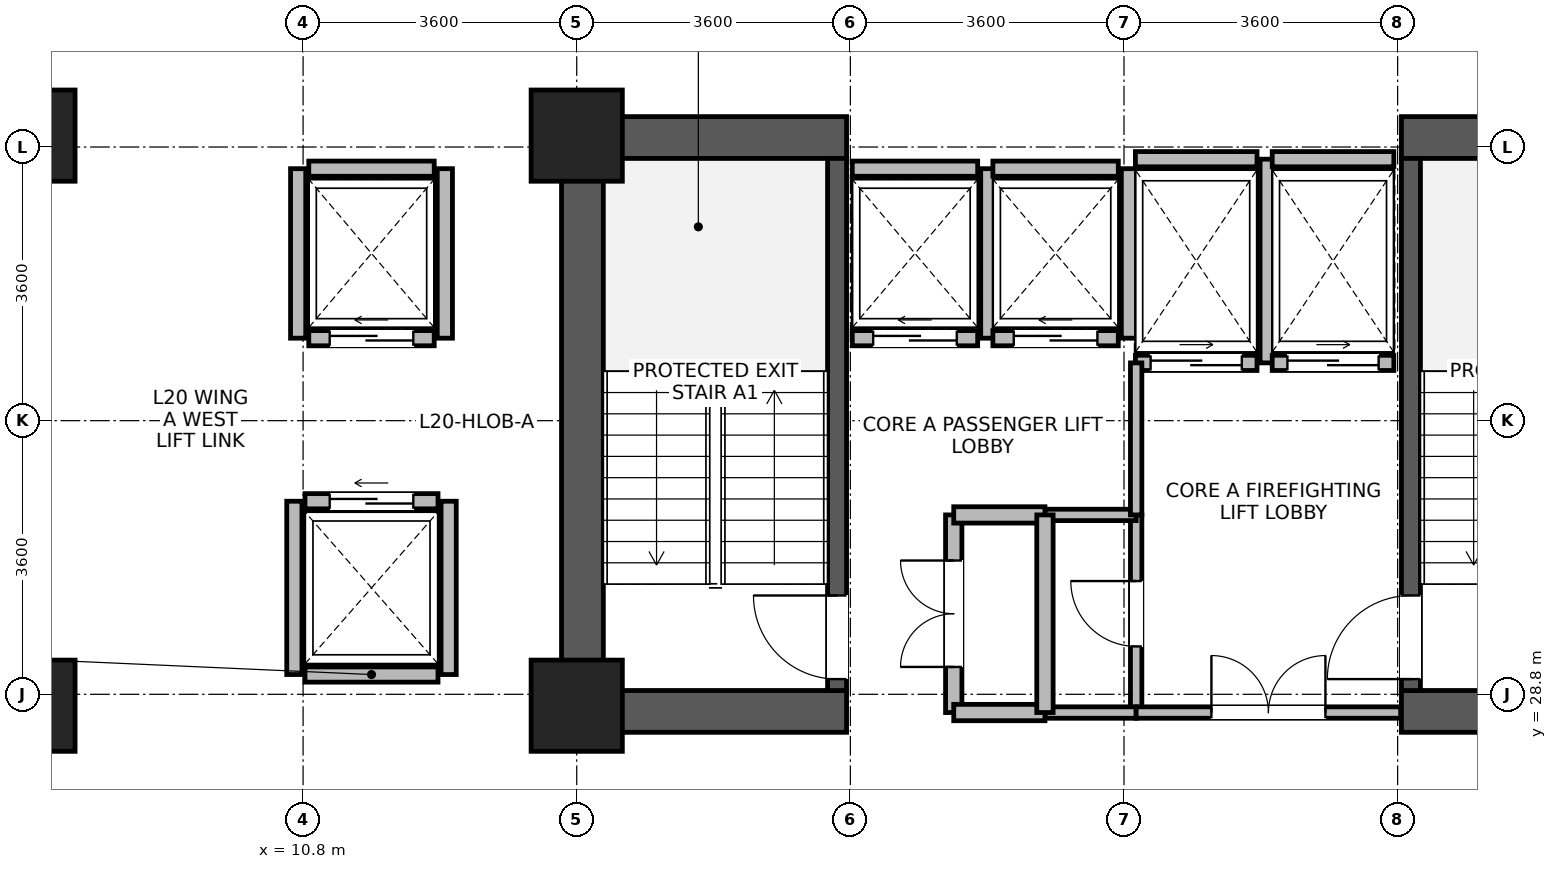
"""IFC4 building model, lengths in metres.
Left out: names, types, materials, properties, quantities, classifications, styles, units other than length and angle.
Written with IfcOpenShell. Run it as: python <this file> out.ifc"""

import sys

from ifc_helpers import new_model, si_unit, direction, frame, frame_2d, origin, origin_2d, place, context, subcontext, project, spatial, rectangle, extrude, source, transform, mapped, element, fill, save


model = new_model("IFC4")
c1 = context("Model", 3, precision=1e-05, world=origin(), true_north=direction((0.0, 1.0)))
c2 = subcontext(c1, "Body", "Model", "MODEL_VIEW")
j1 = project(units=[si_unit("LENGTHUNIT", "METRE"), si_unit("PLANEANGLEUNIT", "RADIAN")], contexts=[c1])
p1 = place(None, origin())
s1 = spatial("IfcSite", under=j1, at=p1, CompositionType="ELEMENT")
p2 = place(p1, origin())
s2 = spatial("IfcBuilding", under=s1, at=p2, CompositionType="ELEMENT")
p3 = place(p2, frame((0.0, 0.0, 82.3)))
s3 = spatial("IfcBuildingStorey", under=s2, at=p3, CompositionType="ELEMENT", Elevation=82.3)
p4 = place(p3, frame((14.475, 28.3, 0.0), z_axis=(0.0, 0.0, 1.0), x_axis=(0.0, 1.0, 0.0)))
e1 = element("IfcWall", 1, at=p4, inside=s3, PredefinedType="SHEAR", context=c2, shape_type="SweptSolid", body=[
    extrude(rectangle(XDim=8.1, YDim=0.55, at=frame_2d((4.05, 0.0))), origin(), (0.0, 0.0, 1.0), 3.45),
])
for number, where, z_axis, x_axis in (
    (2, (14.75, 28.575, 0.0), (0.0, 0.0, 1.0), (1.0, 0.0, 0.0)),
    (3, (25.25, 28.575, 0.0), (0.0, 0.0, 1.0), (1.0, 0.0, 0.0)),
    (4, (14.75, 36.125, 0.0), (0.0, 0.0, 1.0), (1.0, 0.0, 0.0)),
    (5, (25.25, 36.125, 0.0), (0.0, 0.0, 1.0), (1.0, 0.0, 0.0)),
):
    element("IfcWall", number, at=place(p3, frame(where, z_axis=z_axis, x_axis=x_axis)), inside=s3, PredefinedType="SHEAR", context=c2, shape_type="SweptSolid", body=[
        extrude(rectangle(XDim=3.2, YDim=0.55, at=frame_2d((1.6, 0.0))), origin(), (0.0, 0.0, 1.0), 3.45),
    ])
p5 = place(p3, frame((17.825, 28.85, 0.0), z_axis=(0.0, 0.0, 1.0), x_axis=(0.0, 1.0, 0.0)))
e6 = element("IfcWall", 6, at=p5, inside=s3, PredefinedType="SHEAR", context=c2, shape_type="SweptSolid", body=[
    extrude(rectangle(XDim=7.0, YDim=0.25, at=frame_2d((3.5, 0.0))), origin(), (0.0, 0.0, 1.0), 3.45),
])
p6 = place(p5, frame((0.15, 0.0, 0.0)))
e7 = element("IfcOpeningElement", 7, at=p6, cuts=e6, PredefinedType="OPENING", context=c2, shape_type="SweptSolid", body=[
    extrude(rectangle(XDim=1.1, YDim=2.08, at=frame_2d((0.55, 1.04))), frame((0.0, 0.135, 0.0), z_axis=(0.0, -1.0, 0.0), x_axis=(1.0, 0.0, 0.0)), (0.0, 0.0, 1.0), 0.27),
])
p7 = place(p3, frame((25.375, 28.85, 0.0), z_axis=(0.0, 0.0, 1.0), x_axis=(0.0, 1.0, 0.0)))
e8 = element("IfcWall", 8, at=p7, inside=s3, PredefinedType="SHEAR", context=c2, shape_type="SweptSolid", body=[
    extrude(rectangle(XDim=7.0, YDim=0.25, at=frame_2d((3.5, 0.0))), origin(), (0.0, 0.0, 1.0), 3.45),
])
p8 = place(p7, frame((0.15, 0.0, 0.0)))
e9 = element("IfcOpeningElement", 9, at=p8, cuts=e8, PredefinedType="OPENING", context=c2, shape_type="SweptSolid", body=[
    extrude(rectangle(XDim=1.1, YDim=2.08, at=frame_2d((0.55, 1.04))), frame((0.0, 0.135, 0.0), z_axis=(0.0, -1.0, 0.0), x_axis=(1.0, 0.0, 0.0)), (0.0, 0.0, 1.0), 0.27),
])
m1 = source(origin(), c2, "Body", "SweptSolid", [
    extrude(rectangle(XDim=1.2, YDim=1.2, at=origin_2d()), origin(), (0.0, 0.0, 1.0), 3.7),
])
for number, where, z_axis, x_axis in (
    (10, (7.2, 28.65, 0.0), (0.0, 0.0, 1.0), (1.0, 0.0, 0.0)),
    (11, (7.2, 36.15, 0.0), (0.0, 0.0, 1.0), (1.0, 0.0, 0.0)),
    (12, (14.4, 28.65, 0.0), (0.0, 0.0, 1.0), (1.0, 0.0, 0.0)),
    (13, (14.4, 36.15, 0.0), (0.0, 0.0, 1.0), (1.0, 0.0, 0.0)),
):
    element("IfcColumn", number, at=place(p3, frame(where, z_axis=z_axis, x_axis=x_axis)), inside=s3, PredefinedType="COLUMN", context=c2, shape_type="MappedRepresentation", body=[
        mapped(m1, transform((0.0, 0.0, 0.0), x_axis=(1.0, 0.0, 0.0), y_axis=(0.0, 1.0, 0.0), z_axis=(0.0, 0.0, 1.0), scale=1.0)),
    ])
p9 = place(p3, frame((18.025, 33.485, 0.0), z_axis=(0.0, 0.0, 1.0), x_axis=(1.0, 0.0, 0.0)))
e14 = element("IfcWall", 14, at=p9, inside=s3, PredefinedType="PARTITIONING", context=c2, shape_type="SweptSolid", body=[
    extrude(rectangle(XDim=1.65, YDim=0.2, at=frame_2d((0.825, 0.0))), origin(), (0.0, 0.0, 1.0), 3.43),
])
p10 = place(p9, frame((0.275, 0.0, 0.0)))
e15 = element("IfcOpeningElement", 15, at=p10, cuts=e14, PredefinedType="OPENING", context=c2, shape_type="SweptSolid", body=[
    extrude(rectangle(XDim=1.1, YDim=2.12, at=frame_2d((0.55, 1.06))), frame((0.0, 0.11, 0.0), z_axis=(0.0, -1.0, 0.0), x_axis=(1.0, 0.0, 0.0)), (0.0, 0.0, 1.0), 0.22),
])
p11 = place(p3, frame((18.025, 35.715, 0.0), z_axis=(0.0, 0.0, 1.0), x_axis=(1.0, 0.0, 0.0)))
e16 = element("IfcWall", 16, at=p11, inside=s3, PredefinedType="PARTITIONING", context=c2, shape_type="SweptSolid", body=[
    extrude(rectangle(XDim=1.65, YDim=0.2, at=frame_2d((0.825, 0.0))), origin(), (0.0, 0.0, 1.0), 2.23),
])
p12 = place(p3, frame((19.815, 33.485, 0.0), z_axis=(0.0, 0.0, 1.0), x_axis=(0.0, 1.0, 0.0)))
e17 = element("IfcWall", 17, at=p12, inside=s3, PredefinedType="PARTITIONING", context=c2, shape_type="SweptSolid", body=[
    extrude(rectangle(XDim=2.23, YDim=0.2, at=frame_2d((1.115, 0.0))), origin(), (0.0, 0.0, 1.0), 3.43),
])
p13 = place(p3, frame((19.875, 33.485, 0.0), z_axis=(0.0, 0.0, 1.0), x_axis=(1.0, 0.0, 0.0)))
e18 = element("IfcWall", 18, at=p13, inside=s3, PredefinedType="PARTITIONING", context=c2, shape_type="SweptSolid", body=[
    extrude(rectangle(XDim=1.65, YDim=0.2, at=frame_2d((0.825, 0.0))), origin(), (0.0, 0.0, 1.0), 3.43),
])
p14 = place(p13, frame((0.275, 0.0, 0.0)))
e19 = element("IfcOpeningElement", 19, at=p14, cuts=e18, PredefinedType="OPENING", context=c2, shape_type="SweptSolid", body=[
    extrude(rectangle(XDim=1.1, YDim=2.12, at=frame_2d((0.55, 1.06))), frame((0.0, 0.11, 0.0), z_axis=(0.0, -1.0, 0.0), x_axis=(1.0, 0.0, 0.0)), (0.0, 0.0, 1.0), 0.22),
])
p15 = place(p3, frame((19.875, 35.715, 0.0), z_axis=(0.0, 0.0, 1.0), x_axis=(1.0, 0.0, 0.0)))
e20 = element("IfcWall", 20, at=p15, inside=s3, PredefinedType="PARTITIONING", context=c2, shape_type="SweptSolid", body=[
    extrude(rectangle(XDim=1.65, YDim=0.2, at=frame_2d((0.825, 0.0))), origin(), (0.0, 0.0, 1.0), 2.23),
])
p16 = place(p3, frame((21.665, 33.485, 0.0), z_axis=(0.0, 0.0, 1.0), x_axis=(0.0, 1.0, 0.0)))
e21 = element("IfcWall", 21, at=p16, inside=s3, PredefinedType="PARTITIONING", context=c2, shape_type="SweptSolid", body=[
    extrude(rectangle(XDim=2.23, YDim=0.2, at=frame_2d((1.115, 0.0))), origin(), (0.0, 0.0, 1.0), 3.43),
])
p17 = place(p3, frame((10.825, 29.06, 0.0), z_axis=(0.0, 0.0, 1.0), x_axis=(1.0, 0.0, 0.0)))
e22 = element("IfcWall", 22, at=p17, inside=s3, PredefinedType="PARTITIONING", context=c2, shape_type="SweptSolid", body=[
    extrude(rectangle(XDim=1.75, YDim=0.2, at=frame_2d((0.875, 0.0))), origin(), (0.0, 0.0, 1.0), 3.43),
])
p18 = place(p3, frame((10.825, 31.34, 0.0), z_axis=(0.0, 0.0, 1.0), x_axis=(1.0, 0.0, 0.0)))
e23 = element("IfcWall", 23, at=p18, inside=s3, PredefinedType="PARTITIONING", context=c2, shape_type="SweptSolid", body=[
    extrude(rectangle(XDim=1.75, YDim=0.2, at=frame_2d((0.875, 0.0))), origin(), (0.0, 0.0, 1.0), 3.43),
])
p19 = place(p18, frame((0.325, 0.0, 0.0)))
e24 = element("IfcOpeningElement", 24, at=p19, cuts=e23, PredefinedType="OPENING", context=c2, shape_type="SweptSolid", body=[
    extrude(rectangle(XDim=1.1, YDim=2.12, at=frame_2d((0.55, 1.06))), frame((0.0, 0.11, 0.0), z_axis=(0.0, -1.0, 0.0), x_axis=(1.0, 0.0, 0.0)), (0.0, 0.0, 1.0), 0.22),
])
for number, where, z_axis, x_axis in (
    (25, (10.685, 29.06, 0.0), (0.0, 0.0, 1.0), (0.0, 1.0, 0.0)),
    (26, (12.715, 29.06, 0.0), (0.0, 0.0, 1.0), (0.0, 1.0, 0.0)),
):
    element("IfcWall", number, at=place(p3, frame(where, z_axis=z_axis, x_axis=x_axis)), inside=s3, PredefinedType="PARTITIONING", context=c2, shape_type="SweptSolid", body=[
        extrude(rectangle(XDim=2.28, YDim=0.2, at=frame_2d((1.14, 0.0))), origin(), (0.0, 0.0, 1.0), 3.43),
    ])
p20 = place(p3, frame((10.875, 33.485, 0.0), z_axis=(0.0, 0.0, 1.0), x_axis=(1.0, 0.0, 0.0)))
e27 = element("IfcWall", 27, at=p20, inside=s3, PredefinedType="PARTITIONING", context=c2, shape_type="SweptSolid", body=[
    extrude(rectangle(XDim=1.65, YDim=0.2, at=frame_2d((0.825, 0.0))), origin(), (0.0, 0.0, 1.0), 3.43),
])
p21 = place(p20, frame((0.275, 0.0, 0.0)))
e28 = element("IfcOpeningElement", 28, at=p21, cuts=e27, PredefinedType="OPENING", context=c2, shape_type="SweptSolid", body=[
    extrude(rectangle(XDim=1.1, YDim=2.12, at=frame_2d((0.55, 1.06))), frame((0.0, 0.11, 0.0), z_axis=(0.0, -1.0, 0.0), x_axis=(1.0, 0.0, 0.0)), (0.0, 0.0, 1.0), 0.22),
])
p22 = place(p3, frame((10.875, 35.715, 0.0), z_axis=(0.0, 0.0, 1.0), x_axis=(1.0, 0.0, 0.0)))
e29 = element("IfcWall", 29, at=p22, inside=s3, PredefinedType="PARTITIONING", context=c2, shape_type="SweptSolid", body=[
    extrude(rectangle(XDim=1.65, YDim=0.2, at=frame_2d((0.825, 0.0))), origin(), (0.0, 0.0, 1.0), 3.43),
])
for number, where, z_axis, x_axis in (
    (30, (10.735, 33.485, 0.0), (0.0, 0.0, 1.0), (0.0, 1.0, 0.0)),
    (31, (12.665, 33.485, 0.0), (0.0, 0.0, 1.0), (0.0, 1.0, 0.0)),
):
    element("IfcWall", number, at=place(p3, frame(where, z_axis=z_axis, x_axis=x_axis)), inside=s3, PredefinedType="PARTITIONING", context=c2, shape_type="SweptSolid", body=[
        extrude(rectangle(XDim=2.23, YDim=0.2, at=frame_2d((1.115, 0.0))), origin(), (0.0, 0.0, 1.0), 3.43),
    ])
p23 = place(p3, frame((21.75, 33.16, 0.0), z_axis=(0.0, 0.0, 1.0), x_axis=(1.0, 0.0, 0.0)))
e32 = element("IfcWall", 32, at=p23, inside=s3, PredefinedType="PARTITIONING", context=c2, shape_type="SweptSolid", body=[
    extrude(rectangle(XDim=1.6, YDim=0.2, at=frame_2d((0.8, 0.0))), origin(), (0.0, 0.0, 1.0), 3.43),
])
p24 = place(p23, frame((0.2, 0.0, 0.0)))
e33 = element("IfcOpeningElement", 33, at=p24, cuts=e32, PredefinedType="OPENING", context=c2, shape_type="SweptSolid", body=[
    extrude(rectangle(XDim=1.2, YDim=2.12, at=frame_2d((0.6, 1.06))), frame((0.0, 0.11, 0.0), z_axis=(0.0, -1.0, 0.0), x_axis=(1.0, 0.0, 0.0)), (0.0, 0.0, 1.0), 0.22),
])
p25 = place(p3, frame((21.75, 35.84, 0.0), z_axis=(0.0, 0.0, 1.0), x_axis=(1.0, 0.0, 0.0)))
e34 = element("IfcWall", 34, at=p25, inside=s3, PredefinedType="PARTITIONING", context=c2, shape_type="SweptSolid", body=[
    extrude(rectangle(XDim=1.6, YDim=0.2, at=frame_2d((0.8, 0.0))), origin(), (0.0, 0.0, 1.0), 2.23),
])
p26 = place(p3, frame((23.49, 33.16, 0.0), z_axis=(0.0, 0.0, 1.0), x_axis=(0.0, 1.0, 0.0)))
e35 = element("IfcWall", 35, at=p26, inside=s3, PredefinedType="PARTITIONING", context=c2, shape_type="SweptSolid", body=[
    extrude(rectangle(XDim=2.68, YDim=0.2, at=frame_2d((1.34, 0.0))), origin(), (0.0, 0.0, 1.0), 3.43),
])
p27 = place(p3, frame((23.55, 33.16, 0.0), z_axis=(0.0, 0.0, 1.0), x_axis=(1.0, 0.0, 0.0)))
e36 = element("IfcWall", 36, at=p27, inside=s3, PredefinedType="PARTITIONING", context=c2, shape_type="SweptSolid", body=[
    extrude(rectangle(XDim=1.6, YDim=0.2, at=frame_2d((0.8, 0.0))), origin(), (0.0, 0.0, 1.0), 3.43),
])
p28 = place(p27, frame((0.2, 0.0, 0.0)))
e37 = element("IfcOpeningElement", 37, at=p28, cuts=e36, PredefinedType="OPENING", context=c2, shape_type="SweptSolid", body=[
    extrude(rectangle(XDim=1.2, YDim=2.12, at=frame_2d((0.6, 1.06))), frame((0.0, 0.11, 0.0), z_axis=(0.0, -1.0, 0.0), x_axis=(1.0, 0.0, 0.0)), (0.0, 0.0, 1.0), 0.22),
])
p29 = place(p3, frame((23.55, 35.84, 0.0), z_axis=(0.0, 0.0, 1.0), x_axis=(1.0, 0.0, 0.0)))
e38 = element("IfcWall", 38, at=p29, inside=s3, PredefinedType="PARTITIONING", context=c2, shape_type="SweptSolid", body=[
    extrude(rectangle(XDim=1.6, YDim=0.2, at=frame_2d((0.8, 0.0))), origin(), (0.0, 0.0, 1.0), 2.23),
])
p30 = place(p3, frame((19.36, 28.56, 0.0), z_axis=(0.0, 0.0, 1.0), x_axis=(0.0, 1.0, 0.0)))
e39 = element("IfcWall", 39, at=p30, inside=s3, PredefinedType="PARTITIONING", context=c2, shape_type="SweptSolid", body=[
    extrude(rectangle(XDim=2.6, YDim=0.215, at=frame_2d((1.3, 0.0))), origin(), (0.0, 0.0, 1.0), 3.43),
])
p31 = place(p30, frame((0.6, 0.0, 0.0)))
e40 = element("IfcOpeningElement", 40, at=p31, cuts=e39, PredefinedType="OPENING", context=c2, shape_type="SweptSolid", body=[
    extrude(rectangle(XDim=1.4, YDim=2.15, at=frame_2d((0.7, 1.075))), frame((0.0, 0.118, 0.0), z_axis=(0.0, -1.0, 0.0), x_axis=(1.0, 0.0, 0.0)), (0.0, 0.0, 1.0), 0.235),
])
p32 = place(p3, frame((21.76, 28.56, 0.0), z_axis=(0.0, 0.0, 1.0), x_axis=(0.0, 1.0, 0.0)))
e41 = element("IfcWall", 41, at=p32, inside=s3, PredefinedType="PARTITIONING", context=c2, shape_type="SweptSolid", body=[
    extrude(rectangle(XDim=2.6, YDim=0.15, at=frame_2d((1.3, 0.0))), origin(), (0.0, 0.0, 1.0), 3.43),
])
p33 = place(p32, frame((0.87, 0.0, 0.0)))
e42 = element("IfcOpeningElement", 42, at=p33, cuts=e41, PredefinedType="OPENING", context=c2, shape_type="SweptSolid", body=[
    extrude(rectangle(XDim=0.86, YDim=2.02, at=frame_2d((0.43, 1.01))), frame((0.0, 0.085, 0.0), z_axis=(0.0, -1.0, 0.0), x_axis=(1.0, 0.0, 0.0)), (0.0, 0.0, 1.0), 0.17),
])
p34 = place(p3, frame((20.56, 28.56, 0.0), z_axis=(0.0, 0.0, 1.0), x_axis=(1.0, 0.0, 0.0)))
e43 = element("IfcWall", 43, at=p34, inside=s3, PredefinedType="PARTITIONING", context=c2, shape_type="SweptSolid", body=[
    extrude(rectangle(XDim=1.2, YDim=0.15, at=frame_2d((0.6, 0.0))), origin(), (0.0, 0.0, 1.0), 2.23),
])
p35 = place(p3, frame((20.56, 31.16, 0.0), z_axis=(0.0, 0.0, 1.0), x_axis=(1.0, 0.0, 0.0)))
e44 = element("IfcWall", 44, at=p35, inside=s3, PredefinedType="PARTITIONING", context=c2, shape_type="SweptSolid", body=[
    extrude(rectangle(XDim=1.2, YDim=0.15, at=frame_2d((0.6, 0.0))), origin(), (0.0, 0.0, 1.0), 3.43),
])
p36 = place(p3, frame((19.36, 28.56, 0.0), z_axis=(0.0, 0.0, 1.0), x_axis=(1.0, 0.0, 0.0)))
e45 = element("IfcWall", 45, at=p36, inside=s3, PredefinedType="PARTITIONING", context=c2, shape_type="SweptSolid", body=[
    extrude(rectangle(XDim=1.2, YDim=0.215, at=frame_2d((0.6, 0.0))), origin(), (0.0, 0.0, 1.0), 2.23),
])
p37 = place(p3, frame((19.36, 31.16, 0.0), z_axis=(0.0, 0.0, 1.0), x_axis=(1.0, 0.0, 0.0)))
e46 = element("IfcWall", 46, at=p37, inside=s3, PredefinedType="PARTITIONING", context=c2, shape_type="SweptSolid", body=[
    extrude(rectangle(XDim=1.2, YDim=0.215, at=frame_2d((0.6, 0.0))), origin(), (0.0, 0.0, 1.0), 3.43),
])
p38 = place(p3, frame((21.76, 28.56, 0.0), z_axis=(0.0, 0.0, 1.0), x_axis=(1.0, 0.0, 0.0)))
e47 = element("IfcWall", 47, at=p38, inside=s3, PredefinedType="PARTITIONING", context=c2, shape_type="SweptSolid", body=[
    extrude(rectangle(XDim=3.48, YDim=0.15, at=frame_2d((1.74, 0.0))), origin(), (0.0, 0.0, 1.0), 2.23),
])
p39 = place(p38, frame((0.99, 0.0, 0.0)))
e48 = element("IfcOpeningElement", 48, at=p39, cuts=e47, PredefinedType="OPENING", context=c2, shape_type="SweptSolid", body=[
    extrude(rectangle(XDim=1.5, YDim=2.1, at=frame_2d((0.75, 1.05))), frame((0.0, 0.085, 0.0), z_axis=(0.0, -1.0, 0.0), x_axis=(1.0, 0.0, 0.0)), (0.0, 0.0, 1.0), 0.17),
])
p40 = place(p3, frame((20.56, 28.56, 0.0), z_axis=(0.0, 0.0, 1.0), x_axis=(0.0, 1.0, 0.0)))
e49 = element("IfcWall", 49, at=p40, inside=s3, PredefinedType="PARTITIONING", context=c2, shape_type="SweptSolid", body=[
    extrude(rectangle(XDim=2.6, YDim=0.215, at=frame_2d((1.3, 0.0))), origin(), (0.0, 0.0, 1.0), 3.43),
])
p41 = place(p3, frame((21.76, 31.16, 0.0), z_axis=(0.0, 0.0, 1.0), x_axis=(0.0, 1.0, 0.0)))
e50 = element("IfcWall", 50, at=p41, inside=s3, PredefinedType="PARTITIONING", context=c2, shape_type="SweptSolid", body=[
    extrude(rectangle(XDim=2.0, YDim=0.15, at=frame_2d((1.0, 0.0))), origin(), (0.0, 0.0, 1.0), 3.43),
])
p42 = place(p6, origin())
e51 = element("IfcDoor", 51, at=p42, inside=s3, OperationType="SINGLE_SWING_RIGHT", PredefinedType="DOOR", context=c2, shape_type="SweptSolid", body=[
    extrude(rectangle(XDim=1.1, YDim=2.08, at=frame_2d((0.55, 1.04))), frame((0.0, 0.025, 0.0), z_axis=(0.0, -1.0, 0.0), x_axis=(1.0, 0.0, 0.0)), (0.0, 0.0, 1.0), 0.05),
])
fill(e7, e51)
p43 = place(p8, origin())
e52 = element("IfcDoor", 52, at=p43, inside=s3, OperationType="SINGLE_SWING_LEFT", PredefinedType="DOOR", context=c2, shape_type="SweptSolid", body=[
    extrude(rectangle(XDim=1.1, YDim=2.08, at=frame_2d((0.55, 1.04))), frame((0.0, 0.025, 0.0), z_axis=(0.0, -1.0, 0.0), x_axis=(1.0, 0.0, 0.0)), (0.0, 0.0, 1.0), 0.05),
])
fill(e9, e52)
p44 = place(p10, origin())
e53 = element("IfcDoor", 53, at=p44, inside=s3, OperationType="SLIDING_TO_LEFT", PredefinedType="DOOR", context=c2, shape_type="SweptSolid", body=[
    extrude(rectangle(XDim=1.1, YDim=2.12, at=frame_2d((0.55, 1.06))), frame((0.0, 0.025, 0.0), z_axis=(0.0, -1.0, 0.0), x_axis=(1.0, 0.0, 0.0)), (0.0, 0.0, 1.0), 0.05),
])
fill(e15, e53)
p45 = place(p14, origin())
e54 = element("IfcDoor", 54, at=p45, inside=s3, OperationType="SLIDING_TO_LEFT", PredefinedType="DOOR", context=c2, shape_type="SweptSolid", body=[
    extrude(rectangle(XDim=1.1, YDim=2.12, at=frame_2d((0.55, 1.06))), frame((0.0, 0.025, 0.0), z_axis=(0.0, -1.0, 0.0), x_axis=(1.0, 0.0, 0.0)), (0.0, 0.0, 1.0), 0.05),
])
fill(e19, e54)
p46 = place(p19, origin())
e55 = element("IfcDoor", 55, at=p46, inside=s3, OperationType="SLIDING_TO_LEFT", PredefinedType="DOOR", context=c2, shape_type="SweptSolid", body=[
    extrude(rectangle(XDim=1.1, YDim=2.12, at=frame_2d((0.55, 1.06))), frame((0.0, 0.025, 0.0), z_axis=(0.0, -1.0, 0.0), x_axis=(1.0, 0.0, 0.0)), (0.0, 0.0, 1.0), 0.05),
])
fill(e24, e55)
p47 = place(p21, origin())
e56 = element("IfcDoor", 56, at=p47, inside=s3, OperationType="SLIDING_TO_LEFT", PredefinedType="DOOR", context=c2, shape_type="SweptSolid", body=[
    extrude(rectangle(XDim=1.1, YDim=2.12, at=frame_2d((0.55, 1.06))), frame((0.0, 0.025, 0.0), z_axis=(0.0, -1.0, 0.0), x_axis=(1.0, 0.0, 0.0)), (0.0, 0.0, 1.0), 0.05),
])
fill(e28, e56)
p48 = place(p24, origin())
e57 = element("IfcDoor", 57, at=p48, inside=s3, OperationType="SLIDING_TO_RIGHT", PredefinedType="DOOR", context=c2, shape_type="SweptSolid", body=[
    extrude(rectangle(XDim=1.2, YDim=2.12, at=frame_2d((0.6, 1.06))), frame((0.0, 0.025, 0.0), z_axis=(0.0, -1.0, 0.0), x_axis=(1.0, 0.0, 0.0)), (0.0, 0.0, 1.0), 0.05),
])
fill(e33, e57)
p49 = place(p28, origin())
e58 = element("IfcDoor", 58, at=p49, inside=s3, OperationType="SLIDING_TO_RIGHT", PredefinedType="DOOR", context=c2, shape_type="SweptSolid", body=[
    extrude(rectangle(XDim=1.2, YDim=2.12, at=frame_2d((0.6, 1.06))), frame((0.0, 0.025, 0.0), z_axis=(0.0, -1.0, 0.0), x_axis=(1.0, 0.0, 0.0)), (0.0, 0.0, 1.0), 0.05),
])
fill(e37, e58)
p50 = place(p31, origin())
e59 = element("IfcDoor", 59, at=p50, inside=s3, OperationType="DOUBLE_DOOR_SINGLE_SWING", PredefinedType="DOOR", context=c2, shape_type="SweptSolid", body=[
    extrude(rectangle(XDim=1.4, YDim=2.15, at=frame_2d((0.7, 1.075))), frame((0.0, 0.025, 0.0), z_axis=(0.0, -1.0, 0.0), x_axis=(1.0, 0.0, 0.0)), (0.0, 0.0, 1.0), 0.05),
])
fill(e40, e59)
p51 = place(p33, origin())
e60 = element("IfcDoor", 60, at=p51, inside=s3, OperationType="SINGLE_SWING_RIGHT", PredefinedType="DOOR", context=c2, shape_type="SweptSolid", body=[
    extrude(rectangle(XDim=0.86, YDim=2.02, at=frame_2d((0.43, 1.01))), frame((0.0, 0.025, 0.0), z_axis=(0.0, -1.0, 0.0), x_axis=(1.0, 0.0, 0.0)), (0.0, 0.0, 1.0), 0.05),
])
fill(e42, e60)
p52 = place(p39, origin())
e61 = element("IfcDoor", 61, at=p52, inside=s3, OperationType="DOUBLE_DOOR_SINGLE_SWING", PredefinedType="DOOR", context=c2, shape_type="SweptSolid", body=[
    extrude(rectangle(XDim=1.5, YDim=2.1, at=frame_2d((0.75, 1.05))), frame((0.0, 0.025, 0.0), z_axis=(0.0, -1.0, 0.0), x_axis=(1.0, 0.0, 0.0)), (0.0, 0.0, 1.0), 0.05),
])
fill(e48, e61)
save(model, sys.argv[1])
